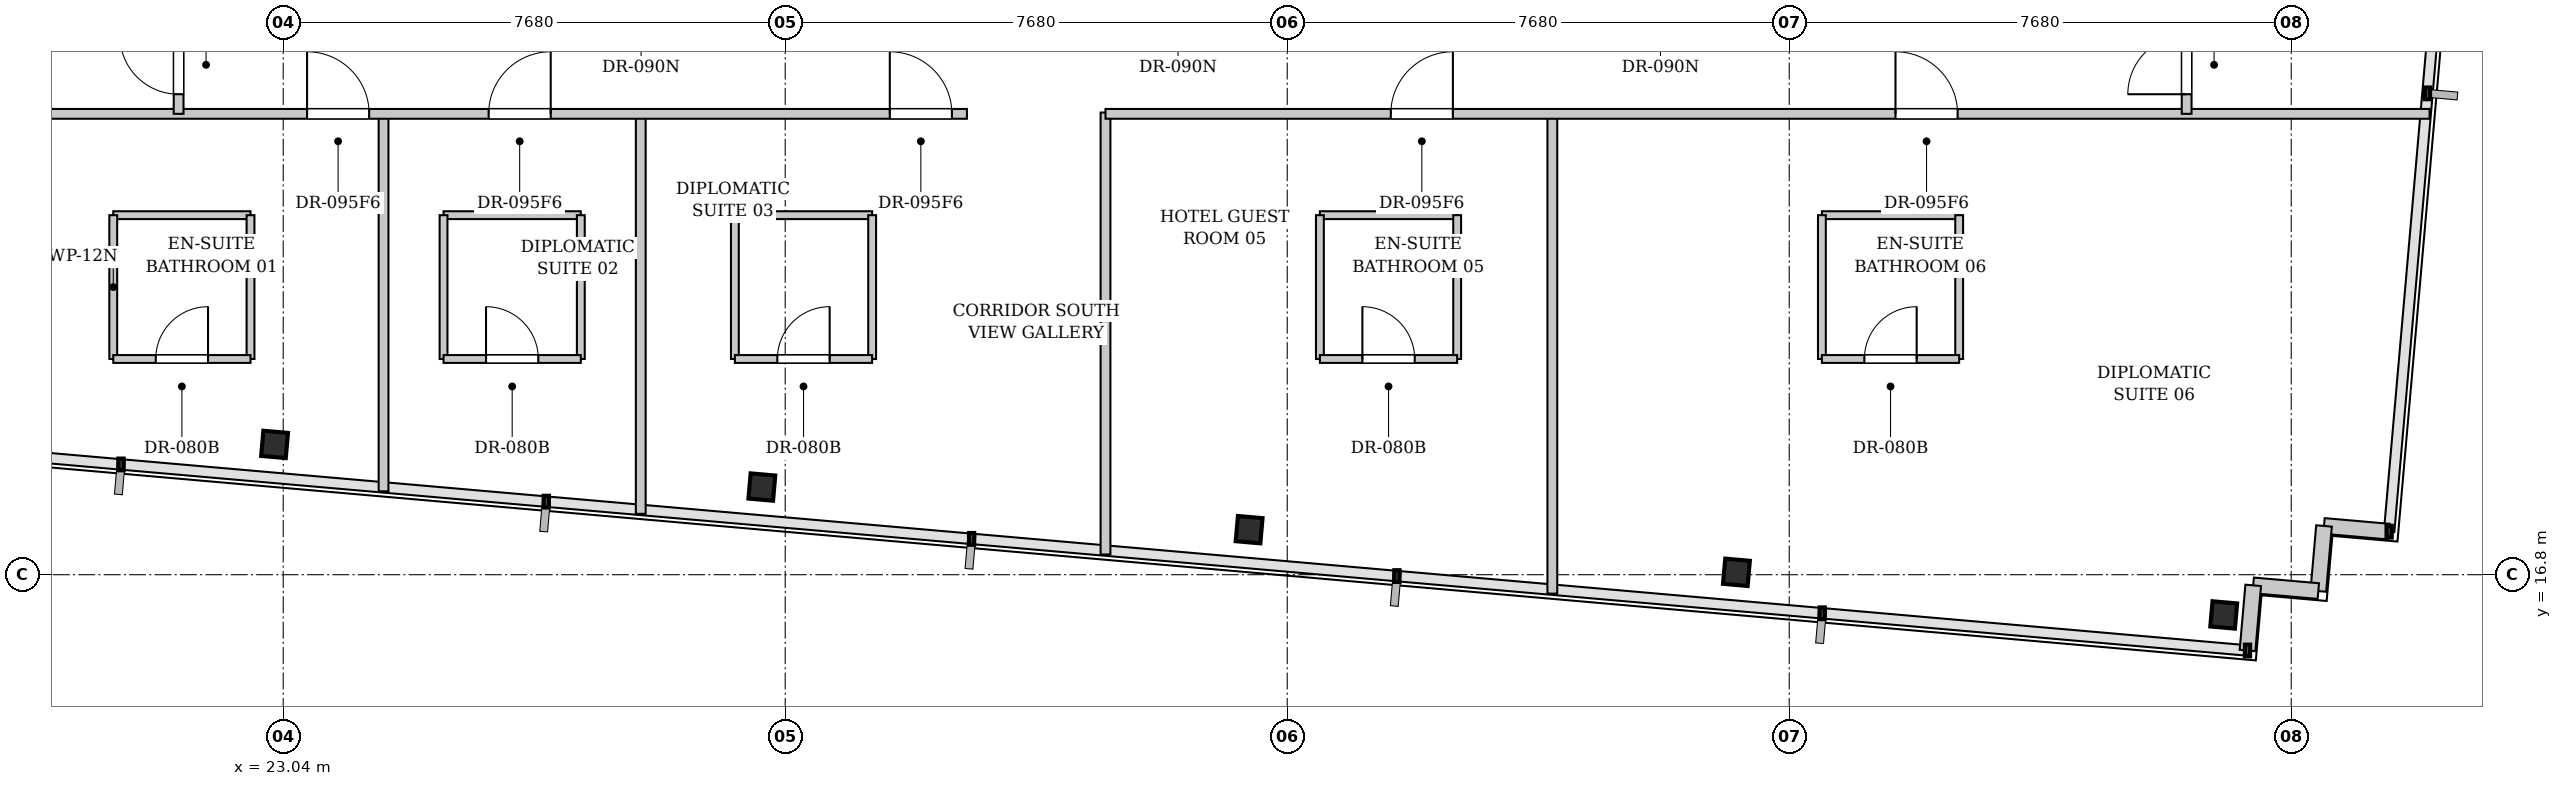
"""IFC4 building model, lengths in metres.
Left out: names, types, materials, properties, quantities, classifications, styles, units other than length and angle.
Written with IfcOpenShell. Run it as: python <this file> out.ifc"""

import sys

from ifc_helpers import new_model, si_unit, direction, frame, frame_2d, origin, origin_2d, place, context, subcontext, project, spatial, rectangle, i_section, extrude, element, fill, save


model = new_model("IFC4")
c1 = context("Model", 3, precision=1e-05, world=origin(), true_north=direction((0.0, 1.0)))
c2 = subcontext(c1, "Body", "Model", "MODEL_VIEW")
j1 = project(units=[si_unit("LENGTHUNIT", "METRE"), si_unit("PLANEANGLEUNIT", "RADIAN")], contexts=[c1])
p1 = place(None, origin())
s1 = spatial("IfcSite", under=j1, at=p1, CompositionType="ELEMENT")
p2 = place(p1, origin())
s2 = spatial("IfcBuilding", under=s1, at=p2, CompositionType="ELEMENT")
p3 = place(p2, frame((0.0, 0.0, 282.9)))
s3 = spatial("IfcBuildingStorey", under=s2, at=p3, CompositionType="ELEMENT", Elevation=282.9)
for number, where, z_axis, x_axis in (
    (1, (22.908, 18.793, 0.0), (0.0, 0.0, 1.0), (0.996, -0.087, 0.0)),
    (2, (30.363, 18.141, 0.0), (0.0, 0.0, 1.0), (0.996, -0.087, 0.0)),
    (3, (37.817, 17.489, 0.0), (0.0, 0.0, 1.0), (0.996, -0.087, 0.0)),
    (4, (45.272, 16.837, 0.0), (0.0, 0.0, 1.0), (0.996, -0.087, 0.0)),
    (5, (52.727, 16.185, 0.0), (0.0, 0.0, 1.0), (0.996, -0.087, 0.0)),
):
    element("IfcColumn", number, at=place(p3, frame(where, z_axis=z_axis, x_axis=x_axis)), inside=s3, PredefinedType="COLUMN", context=c2, shape_type="SweptSolid", body=[
        extrude(i_section(OverallWidth=0.378, OverallDepth=0.387, WebThickness=0.021, FlangeThickness=0.033, FilletRadius=0.015, at=origin_2d()), origin(), (0.0, 0.0, 1.0), 3.4),
    ])
for number, where, z_axis, x_axis in (
    (6, (55.258, 17.459, 0.0), (0.0, 0.0, 1.0), (-0.996, 0.087, 0.0)),
    (7, (54.262, 17.546, 0.0), (0.0, 0.0, 1.0), (-0.087, -0.996, 0.0)),
):
    element("IfcWall", number, at=place(p3, frame(where, z_axis=z_axis, x_axis=x_axis)), inside=s3, PredefinedType="SOLIDWALL", context=c2, shape_type="SweptSolid", body=[
        extrude(rectangle(XDim=1.0, YDim=0.24, at=frame_2d((0.5, 0.0))), origin(), (0.0, 0.0, 1.0), 3.18),
    ])
for number, where, z_axis, x_axis in (
    (8, (54.175, 16.55, 0.0), (0.0, 0.0, 1.0), (-0.996, 0.087, 0.0)),
    (9, (53.178, 16.637, 0.0), (0.0, 0.0, 1.0), (-0.087, -0.996, 0.0)),
):
    element("IfcWall", number, at=place(p3, frame(where, z_axis=z_axis, x_axis=x_axis)), inside=s3, PredefinedType="SOLIDWALL", context=c2, shape_type="SweptSolid", body=[
        extrude(rectangle(XDim=1.0, YDim=0.24, at=frame_2d((0.5, 0.0))), origin(), (0.0, 0.0, 1.0), 3.18),
    ])
p4 = place(p3, frame((20.44, 22.3, 0.0), z_axis=(0.0, 0.0, 1.0), x_axis=(1.0, 0.0, 0.0)))
e10 = element("IfcWall", 10, at=p4, inside=s3, PredefinedType="PARTITIONING", context=c2, shape_type="SweptSolid", body=[
    extrude(rectangle(XDim=2.1, YDim=0.12, at=frame_2d((1.05, 0.0))), origin(), (0.0, 0.0, 1.0), 3.18),
])
for number, where, z_axis, x_axis in (
    (11, (20.44, 20.1, 0.0), (0.0, 0.0, 1.0), (0.0, 1.0, 0.0)),
    (12, (22.54, 20.1, 0.0), (0.0, 0.0, 1.0), (0.0, 1.0, 0.0)),
):
    element("IfcWall", number, at=place(p3, frame(where, z_axis=z_axis, x_axis=x_axis)), inside=s3, PredefinedType="PARTITIONING", context=c2, shape_type="SweptSolid", body=[
        extrude(rectangle(XDim=2.2, YDim=0.12, at=frame_2d((1.1, 0.0))), origin(), (0.0, 0.0, 1.0), 3.18),
    ])
p5 = place(p3, frame((20.44, 20.1, 0.0), z_axis=(0.0, 0.0, 1.0), x_axis=(1.0, 0.0, 0.0)))
e13 = element("IfcWall", 13, at=p5, inside=s3, PredefinedType="PARTITIONING", context=c2, shape_type="SweptSolid", body=[
    extrude(rectangle(XDim=2.1, YDim=0.12, at=frame_2d((1.05, 0.0))), origin(), (0.0, 0.0, 1.0), 3.18),
])
p6 = place(p5, frame((0.65, 0.0, 0.0)))
e14 = element("IfcOpeningElement", 14, at=p6, cuts=e13, PredefinedType="OPENING", context=c2, shape_type="SweptSolid", body=[
    extrude(rectangle(XDim=0.8, YDim=2.1, at=frame_2d((0.4, 1.05))), frame((0.0, 0.07, 0.0), z_axis=(0.0, -1.0, 0.0), x_axis=(1.0, 0.0, 0.0)), (0.0, 0.0, 1.0), 0.14),
])
p7 = place(p3, frame((25.493, 22.3, 0.0), z_axis=(0.0, 0.0, 1.0), x_axis=(1.0, 0.0, 0.0)))
e15 = element("IfcWall", 15, at=p7, inside=s3, PredefinedType="PARTITIONING", context=c2, shape_type="SweptSolid", body=[
    extrude(rectangle(XDim=2.1, YDim=0.12, at=frame_2d((1.05, 0.0))), origin(), (0.0, 0.0, 1.0), 3.18),
])
for number, where, z_axis, x_axis in (
    (16, (25.493, 20.1, 0.0), (0.0, 0.0, 1.0), (0.0, 1.0, 0.0)),
    (17, (27.593, 20.1, 0.0), (0.0, 0.0, 1.0), (0.0, 1.0, 0.0)),
):
    element("IfcWall", number, at=place(p3, frame(where, z_axis=z_axis, x_axis=x_axis)), inside=s3, PredefinedType="PARTITIONING", context=c2, shape_type="SweptSolid", body=[
        extrude(rectangle(XDim=2.2, YDim=0.12, at=frame_2d((1.1, 0.0))), origin(), (0.0, 0.0, 1.0), 3.18),
    ])
p8 = place(p3, frame((25.493, 20.1, 0.0), z_axis=(0.0, 0.0, 1.0), x_axis=(1.0, 0.0, 0.0)))
e18 = element("IfcWall", 18, at=p8, inside=s3, PredefinedType="PARTITIONING", context=c2, shape_type="SweptSolid", body=[
    extrude(rectangle(XDim=2.1, YDim=0.12, at=frame_2d((1.05, 0.0))), origin(), (0.0, 0.0, 1.0), 3.18),
])
p9 = place(p8, frame((0.65, 0.0, 0.0)))
e19 = element("IfcOpeningElement", 19, at=p9, cuts=e18, PredefinedType="OPENING", context=c2, shape_type="SweptSolid", body=[
    extrude(rectangle(XDim=0.8, YDim=2.1, at=frame_2d((0.4, 1.05))), frame((0.0, 0.07, 0.0), z_axis=(0.0, -1.0, 0.0), x_axis=(1.0, 0.0, 0.0)), (0.0, 0.0, 1.0), 0.14),
])
p10 = place(p3, frame((24.575, 18.075, 0.0), z_axis=(0.0, 0.0, 1.0), x_axis=(0.0, 1.0, 0.0)))
e20 = element("IfcWall", 20, at=p10, inside=s3, PredefinedType="PARTITIONING", context=c2, shape_type="SweptSolid", body=[
    extrude(rectangle(XDim=5.795, YDim=0.15, at=frame_2d((2.897, 0.0))), origin(), (0.0, 0.0, 1.0), 3.18),
])
p11 = place(p3, frame((29.95, 22.3, 0.0), z_axis=(0.0, 0.0, 1.0), x_axis=(1.0, 0.0, 0.0)))
e21 = element("IfcWall", 21, at=p11, inside=s3, PredefinedType="PARTITIONING", context=c2, shape_type="SweptSolid", body=[
    extrude(rectangle(XDim=2.1, YDim=0.12, at=frame_2d((1.05, 0.0))), origin(), (0.0, 0.0, 1.0), 3.18),
])
for number, where, z_axis, x_axis in (
    (22, (29.95, 20.1, 0.0), (0.0, 0.0, 1.0), (0.0, 1.0, 0.0)),
    (23, (32.05, 20.1, 0.0), (0.0, 0.0, 1.0), (0.0, 1.0, 0.0)),
):
    element("IfcWall", number, at=place(p3, frame(where, z_axis=z_axis, x_axis=x_axis)), inside=s3, PredefinedType="PARTITIONING", context=c2, shape_type="SweptSolid", body=[
        extrude(rectangle(XDim=2.2, YDim=0.12, at=frame_2d((1.1, 0.0))), origin(), (0.0, 0.0, 1.0), 3.18),
    ])
p12 = place(p3, frame((29.95, 20.1, 0.0), z_axis=(0.0, 0.0, 1.0), x_axis=(1.0, 0.0, 0.0)))
e24 = element("IfcWall", 24, at=p12, inside=s3, PredefinedType="PARTITIONING", context=c2, shape_type="SweptSolid", body=[
    extrude(rectangle(XDim=2.1, YDim=0.12, at=frame_2d((1.05, 0.0))), origin(), (0.0, 0.0, 1.0), 3.18),
])
p13 = place(p12, frame((0.65, 0.0, 0.0)))
e25 = element("IfcOpeningElement", 25, at=p13, cuts=e24, PredefinedType="OPENING", context=c2, shape_type="SweptSolid", body=[
    extrude(rectangle(XDim=0.8, YDim=2.1, at=frame_2d((0.4, 1.05))), frame((0.0, 0.07, 0.0), z_axis=(0.0, -1.0, 0.0), x_axis=(1.0, 0.0, 0.0)), (0.0, 0.0, 1.0), 0.14),
])
p14 = place(p3, frame((28.51, 17.731, 0.0), z_axis=(0.0, 0.0, 1.0), x_axis=(0.0, 1.0, 0.0)))
e26 = element("IfcWall", 26, at=p14, inside=s3, PredefinedType="PARTITIONING", context=c2, shape_type="SweptSolid", body=[
    extrude(rectangle(XDim=6.139, YDim=0.15, at=frame_2d((3.07, 0.0))), origin(), (0.0, 0.0, 1.0), 3.18),
])
p15 = place(p3, frame((38.9, 22.3, 0.0), z_axis=(0.0, 0.0, 1.0), x_axis=(1.0, 0.0, 0.0)))
e27 = element("IfcWall", 27, at=p15, inside=s3, PredefinedType="PARTITIONING", context=c2, shape_type="SweptSolid", body=[
    extrude(rectangle(XDim=2.1, YDim=0.12, at=frame_2d((1.05, 0.0))), origin(), (0.0, 0.0, 1.0), 3.18),
])
for number, where, z_axis, x_axis in (
    (28, (38.9, 20.1, 0.0), (0.0, 0.0, 1.0), (0.0, 1.0, 0.0)),
    (29, (41.0, 20.1, 0.0), (0.0, 0.0, 1.0), (0.0, 1.0, 0.0)),
):
    element("IfcWall", number, at=place(p3, frame(where, z_axis=z_axis, x_axis=x_axis)), inside=s3, PredefinedType="PARTITIONING", context=c2, shape_type="SweptSolid", body=[
        extrude(rectangle(XDim=2.2, YDim=0.12, at=frame_2d((1.1, 0.0))), origin(), (0.0, 0.0, 1.0), 3.18),
    ])
p16 = place(p3, frame((38.9, 20.1, 0.0), z_axis=(0.0, 0.0, 1.0), x_axis=(1.0, 0.0, 0.0)))
e30 = element("IfcWall", 30, at=p16, inside=s3, PredefinedType="PARTITIONING", context=c2, shape_type="SweptSolid", body=[
    extrude(rectangle(XDim=2.1, YDim=0.12, at=frame_2d((1.05, 0.0))), origin(), (0.0, 0.0, 1.0), 3.18),
])
p17 = place(p16, frame((0.65, 0.0, 0.0)))
e31 = element("IfcOpeningElement", 31, at=p17, cuts=e30, PredefinedType="OPENING", context=c2, shape_type="SweptSolid", body=[
    extrude(rectangle(XDim=0.8, YDim=2.1, at=frame_2d((0.4, 1.05))), frame((0.0, 0.07, 0.0), z_axis=(0.0, -1.0, 0.0), x_axis=(1.0, 0.0, 0.0)), (0.0, 0.0, 1.0), 0.14),
])
p18 = place(p3, frame((35.62, 17.109, 0.0), z_axis=(0.0, 0.0, 1.0), x_axis=(0.0, 1.0, 0.0)))
e32 = element("IfcWall", 32, at=p18, inside=s3, PredefinedType="PARTITIONING", context=c2, shape_type="SweptSolid", body=[
    extrude(rectangle(XDim=6.761, YDim=0.15, at=frame_2d((3.381, 0.0))), origin(), (0.0, 0.0, 1.0), 3.18),
])
p19 = place(p3, frame((46.58, 22.3, 0.0), z_axis=(0.0, 0.0, 1.0), x_axis=(1.0, 0.0, 0.0)))
e33 = element("IfcWall", 33, at=p19, inside=s3, PredefinedType="PARTITIONING", context=c2, shape_type="SweptSolid", body=[
    extrude(rectangle(XDim=2.1, YDim=0.12, at=frame_2d((1.05, 0.0))), origin(), (0.0, 0.0, 1.0), 3.18),
])
for number, where, z_axis, x_axis in (
    (34, (46.58, 20.1, 0.0), (0.0, 0.0, 1.0), (0.0, 1.0, 0.0)),
    (35, (48.68, 20.1, 0.0), (0.0, 0.0, 1.0), (0.0, 1.0, 0.0)),
):
    element("IfcWall", number, at=place(p3, frame(where, z_axis=z_axis, x_axis=x_axis)), inside=s3, PredefinedType="PARTITIONING", context=c2, shape_type="SweptSolid", body=[
        extrude(rectangle(XDim=2.2, YDim=0.12, at=frame_2d((1.1, 0.0))), origin(), (0.0, 0.0, 1.0), 3.18),
    ])
p20 = place(p3, frame((46.58, 20.1, 0.0), z_axis=(0.0, 0.0, 1.0), x_axis=(1.0, 0.0, 0.0)))
e36 = element("IfcWall", 36, at=p20, inside=s3, PredefinedType="PARTITIONING", context=c2, shape_type="SweptSolid", body=[
    extrude(rectangle(XDim=2.1, YDim=0.12, at=frame_2d((1.05, 0.0))), origin(), (0.0, 0.0, 1.0), 3.18),
])
p21 = place(p20, frame((0.65, 0.0, 0.0)))
e37 = element("IfcOpeningElement", 37, at=p21, cuts=e36, PredefinedType="OPENING", context=c2, shape_type="SweptSolid", body=[
    extrude(rectangle(XDim=0.8, YDim=2.1, at=frame_2d((0.4, 1.05))), frame((0.0, 0.07, 0.0), z_axis=(0.0, -1.0, 0.0), x_axis=(1.0, 0.0, 0.0)), (0.0, 0.0, 1.0), 0.14),
])
p22 = place(p3, frame((42.456, 16.511, 0.0), z_axis=(0.0, 0.0, 1.0), x_axis=(0.0, 1.0, 0.0)))
e38 = element("IfcWall", 38, at=p22, inside=s3, PredefinedType="PARTITIONING", context=c2, shape_type="SweptSolid", body=[
    extrude(rectangle(XDim=7.359, YDim=0.15, at=frame_2d((3.68, 0.0))), origin(), (0.0, 0.0, 1.0), 3.18),
])
p23 = place(p3, frame((5.847, 23.85, 0.0), z_axis=(0.0, 0.0, 1.0), x_axis=(1.0, 0.0, 0.0)))
e39 = element("IfcWall", 39, at=p23, inside=s3, PredefinedType="PARTITIONING", context=c2, shape_type="SweptSolid", body=[
    extrude(rectangle(XDim=27.653, YDim=0.15, at=frame_2d((13.827, 0.0))), origin(), (0.0, 0.0, 1.0), 2.575),
])
p24 = place(p23, frame((17.558, 0.0, 0.0)))
e40 = element("IfcOpeningElement", 40, at=p24, cuts=e39, PredefinedType="OPENING", context=c2, shape_type="SweptSolid", body=[
    extrude(rectangle(XDim=0.95, YDim=2.15, at=frame_2d((0.475, 1.075))), frame((0.0, 0.085, 0.0), z_axis=(0.0, -1.0, 0.0), x_axis=(1.0, 0.0, 0.0)), (0.0, 0.0, 1.0), 0.17),
])
p25 = place(p23, frame((20.336, 0.0, 0.0)))
e41 = element("IfcOpeningElement", 41, at=p25, cuts=e39, PredefinedType="OPENING", context=c2, shape_type="SweptSolid", body=[
    extrude(rectangle(XDim=0.95, YDim=2.15, at=frame_2d((0.475, 1.075))), frame((0.0, 0.085, 0.0), z_axis=(0.0, -1.0, 0.0), x_axis=(1.0, 0.0, 0.0)), (0.0, 0.0, 1.0), 0.17),
])
p26 = place(p23, frame((26.473, 0.0, 0.0)))
e42 = element("IfcOpeningElement", 42, at=p26, cuts=e39, PredefinedType="OPENING", context=c2, shape_type="SweptSolid", body=[
    extrude(rectangle(XDim=0.95, YDim=2.15, at=frame_2d((0.475, 1.075))), frame((0.0, 0.085, 0.0), z_axis=(0.0, -1.0, 0.0), x_axis=(1.0, 0.0, 0.0)), (0.0, 0.0, 1.0), 0.17),
])
p27 = place(p3, frame((35.62, 23.85, 0.0), z_axis=(0.0, 0.0, 1.0), x_axis=(1.0, 0.0, 0.0)))
e43 = element("IfcWall", 43, at=p27, inside=s3, PredefinedType="PARTITIONING", context=c2, shape_type="SweptSolid", body=[
    extrude(rectangle(XDim=20.257, YDim=0.15, at=frame_2d((10.128, 0.0))), origin(), (0.0, 0.0, 1.0), 3.18),
])
p28 = place(p27, frame((4.365, 0.0, 0.0)))
e44 = element("IfcOpeningElement", 44, at=p28, cuts=e43, PredefinedType="OPENING", context=c2, shape_type="SweptSolid", body=[
    extrude(rectangle(XDim=0.95, YDim=2.15, at=frame_2d((0.475, 1.075))), frame((0.0, 0.085, 0.0), z_axis=(0.0, -1.0, 0.0), x_axis=(1.0, 0.0, 0.0)), (0.0, 0.0, 1.0), 0.17),
])
p29 = place(p27, frame((12.086, 0.0, 0.0)))
e45 = element("IfcOpeningElement", 45, at=p29, cuts=e43, PredefinedType="OPENING", context=c2, shape_type="SweptSolid", body=[
    extrude(rectangle(XDim=0.95, YDim=2.15, at=frame_2d((0.475, 1.075))), frame((0.0, 0.085, 0.0), z_axis=(0.0, -1.0, 0.0), x_axis=(1.0, 0.0, 0.0)), (0.0, 0.0, 1.0), 0.17),
])
p30 = place(p3, frame((21.44, 23.85, 0.0), z_axis=(0.0, 0.0, 1.0), x_axis=(0.0, 1.0, 0.0)))
e46 = element("IfcWall", 46, at=p30, inside=s3, PredefinedType="PARTITIONING", context=c2, shape_type="SweptSolid", body=[
    extrude(rectangle(XDim=25.658, YDim=0.15, at=frame_2d((12.829, 0.0))), origin(), (0.0, 0.0, 1.0), 2.575),
])
p31 = place(p30, frame((0.3, 0.0, 0.0)))
e47 = element("IfcOpeningElement", 47, at=p31, cuts=e46, PredefinedType="OPENING", context=c2, shape_type="SweptSolid", body=[
    extrude(rectangle(XDim=0.9, YDim=2.15, at=frame_2d((0.45, 1.075))), frame((0.0, 0.085, 0.0), z_axis=(0.0, -1.0, 0.0), x_axis=(1.0, 0.0, 0.0)), (0.0, 0.0, 1.0), 0.17),
])
p32 = place(p3, frame((52.16, 23.85, 0.0), z_axis=(0.0, 0.0, 1.0), x_axis=(0.0, 1.0, 0.0)))
e48 = element("IfcWall", 48, at=p32, inside=s3, PredefinedType="PARTITIONING", context=c2, shape_type="SweptSolid", body=[
    extrude(rectangle(XDim=11.29, YDim=0.15, at=frame_2d((5.645, 0.0))), origin(), (0.0, 0.0, 1.0), 3.18),
])
p33 = place(p32, frame((0.3, 0.0, 0.0)))
e49 = element("IfcOpeningElement", 49, at=p33, cuts=e48, PredefinedType="OPENING", context=c2, shape_type="SweptSolid", body=[
    extrude(rectangle(XDim=0.9, YDim=2.15, at=frame_2d((0.45, 1.075))), frame((0.0, 0.085, 0.0), z_axis=(0.0, -1.0, 0.0), x_axis=(1.0, 0.0, 0.0)), (0.0, 0.0, 1.0), 0.17),
])
p34 = place(p6, origin())
e50 = element("IfcDoor", 50, at=p34, inside=s3, OperationType="SINGLE_SWING_RIGHT", PredefinedType="DOOR", context=c2, shape_type="SweptSolid", body=[
    extrude(rectangle(XDim=0.8, YDim=2.1, at=frame_2d((0.4, 1.05))), frame((0.0, 0.025, 0.0), z_axis=(0.0, -1.0, 0.0), x_axis=(1.0, 0.0, 0.0)), (0.0, 0.0, 1.0), 0.05),
])
fill(e14, e50)
p35 = place(p9, origin())
e51 = element("IfcDoor", 51, at=p35, inside=s3, OperationType="SINGLE_SWING_LEFT", PredefinedType="DOOR", context=c2, shape_type="SweptSolid", body=[
    extrude(rectangle(XDim=0.8, YDim=2.1, at=frame_2d((0.4, 1.05))), frame((0.0, 0.025, 0.0), z_axis=(0.0, -1.0, 0.0), x_axis=(1.0, 0.0, 0.0)), (0.0, 0.0, 1.0), 0.05),
])
fill(e19, e51)
p36 = place(p13, origin())
e52 = element("IfcDoor", 52, at=p36, inside=s3, OperationType="SINGLE_SWING_RIGHT", PredefinedType="DOOR", context=c2, shape_type="SweptSolid", body=[
    extrude(rectangle(XDim=0.8, YDim=2.1, at=frame_2d((0.4, 1.05))), frame((0.0, 0.025, 0.0), z_axis=(0.0, -1.0, 0.0), x_axis=(1.0, 0.0, 0.0)), (0.0, 0.0, 1.0), 0.05),
])
fill(e25, e52)
p37 = place(p17, origin())
e53 = element("IfcDoor", 53, at=p37, inside=s3, OperationType="SINGLE_SWING_LEFT", PredefinedType="DOOR", context=c2, shape_type="SweptSolid", body=[
    extrude(rectangle(XDim=0.8, YDim=2.1, at=frame_2d((0.4, 1.05))), frame((0.0, 0.025, 0.0), z_axis=(0.0, -1.0, 0.0), x_axis=(1.0, 0.0, 0.0)), (0.0, 0.0, 1.0), 0.05),
])
fill(e31, e53)
p38 = place(p21, origin())
e54 = element("IfcDoor", 54, at=p38, inside=s3, OperationType="SINGLE_SWING_RIGHT", PredefinedType="DOOR", context=c2, shape_type="SweptSolid", body=[
    extrude(rectangle(XDim=0.8, YDim=2.1, at=frame_2d((0.4, 1.05))), frame((0.0, 0.025, 0.0), z_axis=(0.0, -1.0, 0.0), x_axis=(1.0, 0.0, 0.0)), (0.0, 0.0, 1.0), 0.05),
])
fill(e37, e54)
p39 = place(p24, origin())
e55 = element("IfcDoor", 55, at=p39, inside=s3, OperationType="SINGLE_SWING_LEFT", PredefinedType="DOOR", context=c2, shape_type="SweptSolid", body=[
    extrude(rectangle(XDim=0.95, YDim=2.15, at=frame_2d((0.475, 1.075))), frame((0.0, 0.025, 0.0), z_axis=(0.0, -1.0, 0.0), x_axis=(1.0, 0.0, 0.0)), (0.0, 0.0, 1.0), 0.05),
])
fill(e40, e55)
p40 = place(p25, origin())
e56 = element("IfcDoor", 56, at=p40, inside=s3, OperationType="SINGLE_SWING_RIGHT", PredefinedType="DOOR", context=c2, shape_type="SweptSolid", body=[
    extrude(rectangle(XDim=0.95, YDim=2.15, at=frame_2d((0.475, 1.075))), frame((0.0, 0.025, 0.0), z_axis=(0.0, -1.0, 0.0), x_axis=(1.0, 0.0, 0.0)), (0.0, 0.0, 1.0), 0.05),
])
fill(e41, e56)
p41 = place(p26, origin())
e57 = element("IfcDoor", 57, at=p41, inside=s3, OperationType="SINGLE_SWING_LEFT", PredefinedType="DOOR", context=c2, shape_type="SweptSolid", body=[
    extrude(rectangle(XDim=0.95, YDim=2.15, at=frame_2d((0.475, 1.075))), frame((0.0, 0.025, 0.0), z_axis=(0.0, -1.0, 0.0), x_axis=(1.0, 0.0, 0.0)), (0.0, 0.0, 1.0), 0.05),
])
fill(e42, e57)
p42 = place(p28, origin())
e58 = element("IfcDoor", 58, at=p42, inside=s3, OperationType="SINGLE_SWING_RIGHT", PredefinedType="DOOR", context=c2, shape_type="SweptSolid", body=[
    extrude(rectangle(XDim=0.95, YDim=2.15, at=frame_2d((0.475, 1.075))), frame((0.0, 0.025, 0.0), z_axis=(0.0, -1.0, 0.0), x_axis=(1.0, 0.0, 0.0)), (0.0, 0.0, 1.0), 0.05),
])
fill(e44, e58)
p43 = place(p29, origin())
e59 = element("IfcDoor", 59, at=p43, inside=s3, OperationType="SINGLE_SWING_LEFT", PredefinedType="DOOR", context=c2, shape_type="SweptSolid", body=[
    extrude(rectangle(XDim=0.95, YDim=2.15, at=frame_2d((0.475, 1.075))), frame((0.0, 0.025, 0.0), z_axis=(0.0, -1.0, 0.0), x_axis=(1.0, 0.0, 0.0)), (0.0, 0.0, 1.0), 0.05),
])
fill(e45, e59)
p44 = place(p31, origin())
e60 = element("IfcDoor", 60, at=p44, inside=s3, OperationType="SINGLE_SWING_RIGHT", PredefinedType="DOOR", context=c2, shape_type="SweptSolid", body=[
    extrude(rectangle(XDim=0.9, YDim=2.15, at=frame_2d((0.45, 1.075))), frame((0.0, 0.025, 0.0), z_axis=(0.0, -1.0, 0.0), x_axis=(1.0, 0.0, 0.0)), (0.0, 0.0, 1.0), 0.05),
])
fill(e47, e60)
p45 = place(p33, origin())
e61 = element("IfcDoor", 61, at=p45, inside=s3, OperationType="SINGLE_SWING_LEFT", PredefinedType="DOOR", context=c2, shape_type="SweptSolid", body=[
    extrude(rectangle(XDim=0.9, YDim=2.15, at=frame_2d((0.45, 1.075))), frame((0.0, 0.025, 0.0), z_axis=(0.0, -1.0, 0.0), x_axis=(1.0, 0.0, 0.0)), (0.0, 0.0, 1.0), 0.05),
])
fill(e49, e61)
save(model, sys.argv[1])
